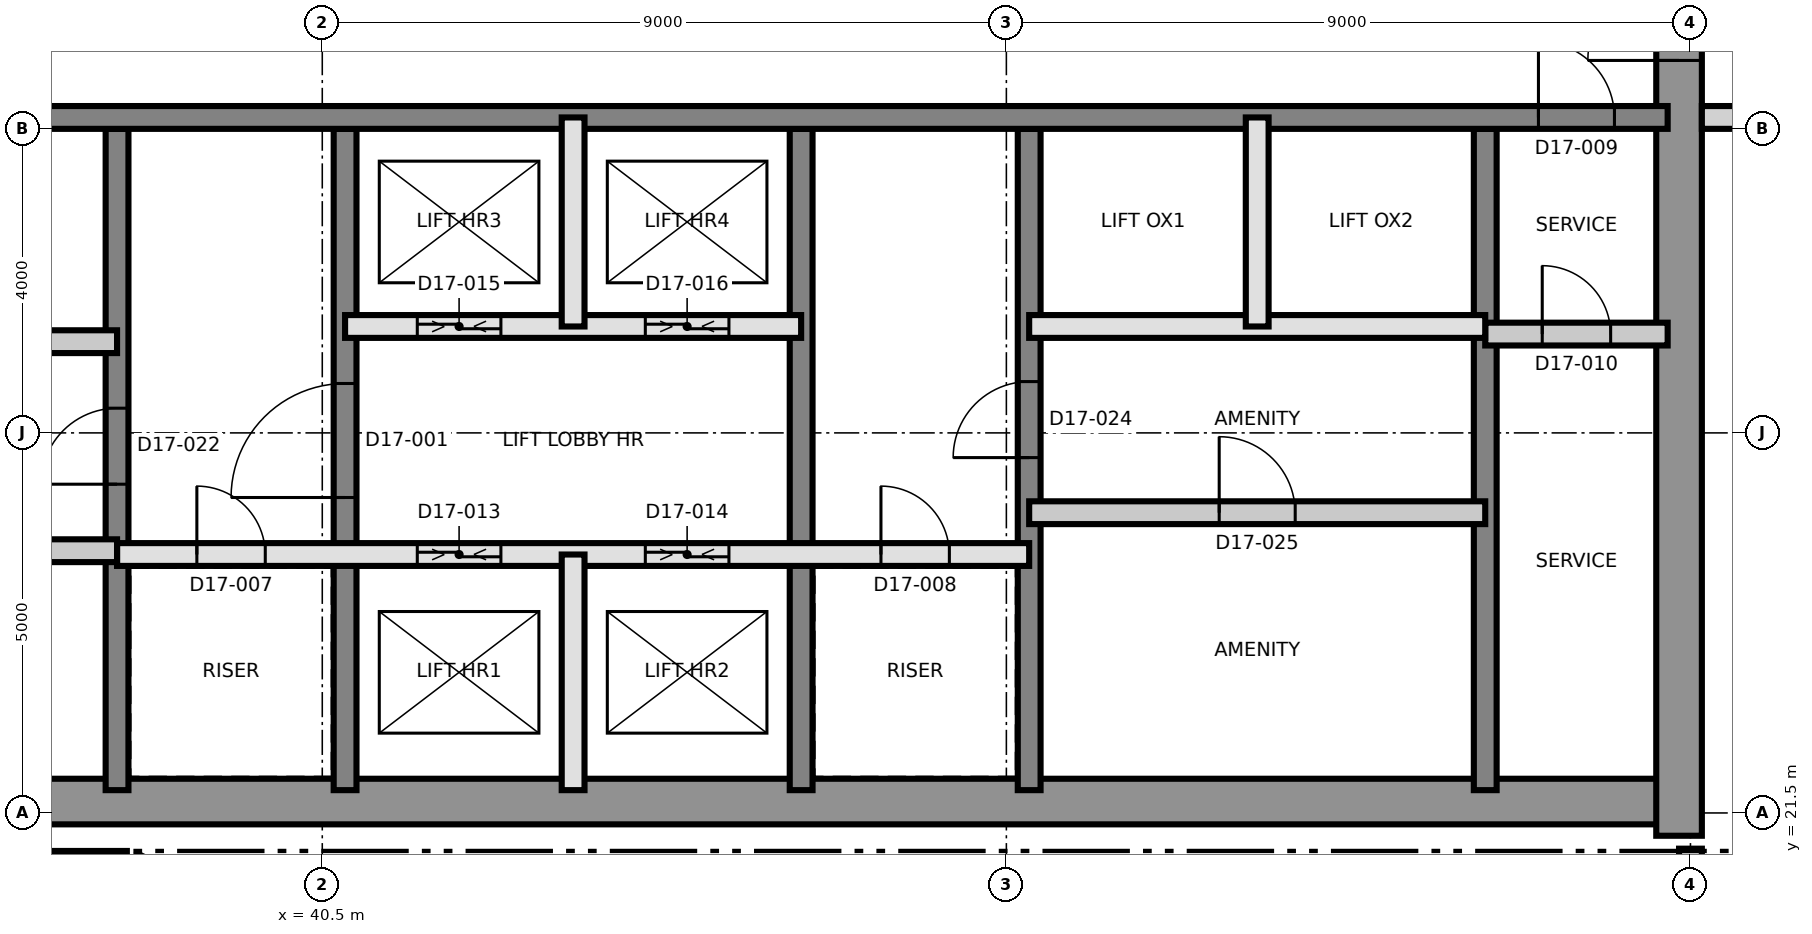
"""IFC4 building model, lengths in metres.
Left out: names, types, materials, properties, quantities, classifications, styles, units other than length and angle.
Written with IfcOpenShell. Run it as: python <this file> out.ifc"""

import sys

from ifc_helpers import new_model, si_unit, direction, frame, frame_2d, origin, place, context, subcontext, project, spatial, rectangle, extrude, element, fill, save


model = new_model("IFC4")
c1 = context("Model", 3, precision=1e-05, world=origin(), true_north=direction((0.0, 1.0)))
c2 = subcontext(c1, "Body", "Model", "MODEL_VIEW")
j1 = project(units=[si_unit("LENGTHUNIT", "METRE"), si_unit("PLANEANGLEUNIT", "RADIAN")], contexts=[c1])
p1 = place(None, origin())
s1 = spatial("IfcSite", under=j1, at=p1, CompositionType="ELEMENT")
p2 = place(p1, origin())
s2 = spatial("IfcBuilding", under=s1, at=p2, CompositionType="ELEMENT")
p3 = place(p2, frame((0.0, 0.0, 171.8)))
s3 = spatial("IfcBuildingStorey", under=s2, at=p3, CompositionType="ELEMENT", Elevation=171.8)
p4 = place(p3, frame((31.2, 21.65, 0.0), z_axis=(0.0, 0.0, 1.0), x_axis=(1.0, 0.0, 0.0)))
e1 = element("IfcWall", 1, at=p4, inside=s3, PredefinedType="SHEAR", context=c2, shape_type="SweptSolid", body=[
    extrude(rectangle(XDim=27.0, YDim=0.6, at=frame_2d((13.5, 0.0))), origin(), (0.0, 0.0, 1.0), 3.7),
])
p5 = place(p3, frame((58.35, 21.2, 0.0), z_axis=(0.0, 0.0, 1.0), x_axis=(0.0, 1.0, 0.0)))
e2 = element("IfcWall", 2, at=p5, inside=s3, PredefinedType="SHEAR", context=c2, shape_type="SweptSolid", body=[
    extrude(rectangle(XDim=18.6, YDim=0.6, at=frame_2d((9.3, 0.0))), origin(), (0.0, 0.0, 1.0), 3.7),
])
p6 = place(p5, frame((10.2, 0.0, 0.0)))
e3 = element("IfcOpeningElement", 3, at=p6, cuts=e2, PredefinedType="OPENING", context=c2, shape_type="SweptSolid", body=[
    extrude(rectangle(XDim=1.2, YDim=2.1, at=frame_2d((0.6, 1.05))), frame((0.0, 0.31, 0.0), z_axis=(0.0, -1.0, 0.0), x_axis=(1.0, 0.0, 0.0)), (0.0, 0.0, 1.0), 0.62),
])
p7 = place(p3, frame((37.8, 21.8, 0.0), z_axis=(0.0, 0.0, 1.0), x_axis=(0.0, 1.0, 0.0)))
e4 = element("IfcWall", 4, at=p7, inside=s3, PredefinedType="SHEAR", context=c2, shape_type="SweptSolid", body=[
    extrude(rectangle(XDim=8.7, YDim=0.3, at=frame_2d((4.35, 0.0))), origin(), (0.0, 0.0, 1.0), 3.7),
])
p8 = place(p7, frame((4.025, 0.0, 0.0)))
e5 = element("IfcOpeningElement", 5, at=p8, cuts=e4, PredefinedType="OPENING", context=c2, shape_type="SweptSolid", body=[
    extrude(rectangle(XDim=1.0, YDim=2.1, at=frame_2d((0.5, 1.05))), frame((0.0, 0.16, 0.0), z_axis=(0.0, -1.0, 0.0), x_axis=(1.0, 0.0, 0.0)), (0.0, 0.0, 1.0), 0.32),
])
p9 = place(p3, frame((40.8, 21.8, 0.0), z_axis=(0.0, 0.0, 1.0), x_axis=(0.0, 1.0, 0.0)))
e6 = element("IfcWall", 6, at=p9, inside=s3, PredefinedType="SHEAR", context=c2, shape_type="SweptSolid", body=[
    extrude(rectangle(XDim=8.7, YDim=0.3, at=frame_2d((4.35, 0.0))), origin(), (0.0, 0.0, 1.0), 3.7),
])
p10 = place(p9, frame((3.85, 0.0, 0.0)))
e7 = element("IfcOpeningElement", 7, at=p10, cuts=e6, PredefinedType="OPENING", context=c2, shape_type="SweptSolid", body=[
    extrude(rectangle(XDim=1.5, YDim=2.1, at=frame_2d((0.75, 1.05))), frame((0.0, 0.16, 0.0), z_axis=(0.0, -1.0, 0.0), x_axis=(1.0, 0.0, 0.0)), (0.0, 0.0, 1.0), 0.32),
])
p11 = place(p3, frame((46.8, 21.8, 0.0), z_axis=(0.0, 0.0, 1.0), x_axis=(0.0, 1.0, 0.0)))
e8 = element("IfcWall", 8, at=p11, inside=s3, PredefinedType="SHEAR", context=c2, shape_type="SweptSolid", body=[
    extrude(rectangle(XDim=8.7, YDim=0.3, at=frame_2d((4.35, 0.0))), origin(), (0.0, 0.0, 1.0), 3.7),
])
p12 = place(p3, frame((49.8, 21.8, 0.0), z_axis=(0.0, 0.0, 1.0), x_axis=(0.0, 1.0, 0.0)))
e9 = element("IfcWall", 9, at=p12, inside=s3, PredefinedType="SHEAR", context=c2, shape_type="SweptSolid", body=[
    extrude(rectangle(XDim=8.7, YDim=0.3, at=frame_2d((4.35, 0.0))), origin(), (0.0, 0.0, 1.0), 3.7),
])
p13 = place(p12, frame((4.375, 0.0, 0.0)))
e10 = element("IfcOpeningElement", 10, at=p13, cuts=e9, PredefinedType="OPENING", context=c2, shape_type="SweptSolid", body=[
    extrude(rectangle(XDim=1.0, YDim=2.1, at=frame_2d((0.5, 1.05))), frame((0.0, 0.16, 0.0), z_axis=(0.0, -1.0, 0.0), x_axis=(1.0, 0.0, 0.0)), (0.0, 0.0, 1.0), 0.32),
])
p14 = place(p3, frame((55.8, 21.8, 0.0), z_axis=(0.0, 0.0, 1.0), x_axis=(0.0, 1.0, 0.0)))
e11 = element("IfcWall", 11, at=p14, inside=s3, PredefinedType="SHEAR", context=c2, shape_type="SweptSolid", body=[
    extrude(rectangle(XDim=8.7, YDim=0.3, at=frame_2d((4.35, 0.0))), origin(), (0.0, 0.0, 1.0), 3.7),
])
p15 = place(p3, frame((31.8, 30.65, 0.0), z_axis=(0.0, 0.0, 1.0), x_axis=(1.0, 0.0, 0.0)))
e12 = element("IfcWall", 12, at=p15, inside=s3, PredefinedType="SHEAR", context=c2, shape_type="SweptSolid", body=[
    extrude(rectangle(XDim=26.4, YDim=0.3, at=frame_2d((13.2, 0.0))), origin(), (0.0, 0.0, 1.0), 3.7),
])
p16 = place(p15, frame((24.7, 0.0, 0.0)))
e13 = element("IfcOpeningElement", 13, at=p16, cuts=e12, PredefinedType="OPENING", context=c2, shape_type="SweptSolid", body=[
    extrude(rectangle(XDim=1.0, YDim=2.1, at=frame_2d((0.5, 1.05))), frame((0.0, 0.16, 0.0), z_axis=(0.0, -1.0, 0.0), x_axis=(1.0, 0.0, 0.0)), (0.0, 0.0, 1.0), 0.32),
])
p17 = place(p15, frame((4.0, 0.0, 0.0)))
e14 = element("IfcOpeningElement", 14, at=p17, cuts=e12, PredefinedType="OPENING", context=c2, shape_type="SweptSolid", body=[
    extrude(rectangle(XDim=1.0, YDim=2.1, at=frame_2d((0.5, 1.05))), frame((0.0, 0.16, 0.0), z_axis=(0.0, -1.0, 0.0), x_axis=(1.0, 0.0, 0.0)), (0.0, 0.0, 1.0), 0.32),
])
p18 = place(p3, frame((31.36, 20.85, 0.0), z_axis=(0.0, 0.0, 1.0), x_axis=(1.0, 0.0, 0.0)))
e15 = element("IfcWall", 15, at=p18, inside=s3, PredefinedType="SOLIDWALL", context=c2, shape_type="SweptSolid", body=[
    extrude(rectangle(XDim=6.569, YDim=0.3, at=frame_2d((3.285, 0.0))), origin(), (0.0, 0.0, 1.0), 3.4),
])
p19 = place(p3, frame((37.995, 20.834, 0.0), z_axis=(0.0, 0.0, 1.0), x_axis=(0.896947675211, -0.442136707291, 0.0)))
e16 = element("IfcWall", 16, at=p19, inside=s3, PredefinedType="SOLIDWALL", context=c2, shape_type="SweptSolid", body=[
    extrude(rectangle(XDim=0.501, YDim=0.3, at=frame_2d((0.25, 0.0))), origin(), (0.0, 0.0, 1.0), 3.4),
])
p20 = place(p3, frame((37.8, 24.9, 0.0), z_axis=(0.0, 0.0, 1.0), x_axis=(1.0, 0.0, 0.0)))
e17 = element("IfcWall", 17, at=p20, inside=s3, PredefinedType="SOLIDWALL", context=c2, shape_type="SweptSolid", body=[
    extrude(rectangle(XDim=12.0, YDim=0.3, at=frame_2d((6.0, 0.0))), origin(), (0.0, 0.0, 1.0), 3.4),
])
p21 = place(p20, frame((1.05, 0.0, 0.0)))
e18 = element("IfcOpeningElement", 18, at=p21, cuts=e17, PredefinedType="OPENING", context=c2, shape_type="SweptSolid", body=[
    extrude(rectangle(XDim=0.9, YDim=2.1, at=frame_2d((0.45, 1.05))), frame((0.0, 0.16, 0.0), z_axis=(0.0, -1.0, 0.0), x_axis=(1.0, 0.0, 0.0)), (0.0, 0.0, 1.0), 0.32),
])
p22 = place(p20, frame((10.05, 0.0, 0.0)))
e19 = element("IfcOpeningElement", 19, at=p22, cuts=e17, PredefinedType="OPENING", context=c2, shape_type="SweptSolid", body=[
    extrude(rectangle(XDim=0.9, YDim=2.1, at=frame_2d((0.45, 1.05))), frame((0.0, 0.16, 0.0), z_axis=(0.0, -1.0, 0.0), x_axis=(1.0, 0.0, 0.0)), (0.0, 0.0, 1.0), 0.32),
])
p23 = place(p20, frame((3.95, 0.0, 0.0)))
e20 = element("IfcOpeningElement", 20, at=p23, cuts=e17, PredefinedType="OPENING", context=c2, shape_type="SweptSolid", body=[
    extrude(rectangle(XDim=1.1, YDim=2.4, at=frame_2d((0.55, 1.2))), frame((0.0, 0.16, 0.0), z_axis=(0.0, -1.0, 0.0), x_axis=(1.0, 0.0, 0.0)), (0.0, 0.0, 1.0), 0.32),
])
p24 = place(p20, frame((6.95, 0.0, 0.0)))
e21 = element("IfcOpeningElement", 21, at=p24, cuts=e17, PredefinedType="OPENING", context=c2, shape_type="SweptSolid", body=[
    extrude(rectangle(XDim=1.1, YDim=2.4, at=frame_2d((0.55, 1.2))), frame((0.0, 0.16, 0.0), z_axis=(0.0, -1.0, 0.0), x_axis=(1.0, 0.0, 0.0)), (0.0, 0.0, 1.0), 0.32),
])
p25 = place(p3, frame((31.8, 24.95, 0.0), z_axis=(0.0, 0.0, 1.0), x_axis=(1.0, 0.0, 0.0)))
e22 = element("IfcWall", 22, at=p25, inside=s3, PredefinedType="PARTITIONING", context=c2, shape_type="SweptSolid", body=[
    extrude(rectangle(XDim=6.0, YDim=0.3, at=frame_2d((3.0, 0.0))), origin(), (0.0, 0.0, 1.0), 3.4),
])
p26 = place(p25, frame((2.5, 0.0, 0.0)))
e23 = element("IfcOpeningElement", 23, at=p26, cuts=e22, PredefinedType="OPENING", context=c2, shape_type="SweptSolid", body=[
    extrude(rectangle(XDim=1.0, YDim=2.1, at=frame_2d((0.5, 1.05))), frame((0.0, 0.16, 0.0), z_axis=(0.0, -1.0, 0.0), x_axis=(1.0, 0.0, 0.0)), (0.0, 0.0, 1.0), 0.32),
])
p27 = place(p3, frame((49.8, 25.45, 0.0), z_axis=(0.0, 0.0, 1.0), x_axis=(1.0, 0.0, 0.0)))
e24 = element("IfcWall", 24, at=p27, inside=s3, PredefinedType="PARTITIONING", context=c2, shape_type="SweptSolid", body=[
    extrude(rectangle(XDim=6.0, YDim=0.3, at=frame_2d((3.0, 0.0))), origin(), (0.0, 0.0, 1.0), 3.4),
])
p28 = place(p27, frame((2.5, 0.0, 0.0)))
e25 = element("IfcOpeningElement", 25, at=p28, cuts=e24, PredefinedType="OPENING", context=c2, shape_type="SweptSolid", body=[
    extrude(rectangle(XDim=1.0, YDim=2.1, at=frame_2d((0.5, 1.05))), frame((0.0, 0.16, 0.0), z_axis=(0.0, -1.0, 0.0), x_axis=(1.0, 0.0, 0.0)), (0.0, 0.0, 1.0), 0.32),
])
p29 = place(p3, frame((31.8, 27.7, 0.0), z_axis=(0.0, 0.0, 1.0), x_axis=(1.0, 0.0, 0.0)))
e26 = element("IfcWall", 26, at=p29, inside=s3, PredefinedType="PARTITIONING", context=c2, shape_type="SweptSolid", body=[
    extrude(rectangle(XDim=6.0, YDim=0.3, at=frame_2d((3.0, 0.0))), origin(), (0.0, 0.0, 1.0), 3.4),
])
p30 = place(p3, frame((55.8, 27.8, 0.0), z_axis=(0.0, 0.0, 1.0), x_axis=(1.0, 0.0, 0.0)))
e27 = element("IfcWall", 27, at=p30, inside=s3, PredefinedType="PARTITIONING", context=c2, shape_type="SweptSolid", body=[
    extrude(rectangle(XDim=2.4, YDim=0.3, at=frame_2d((1.2, 0.0))), origin(), (0.0, 0.0, 1.0), 3.4),
])
p31 = place(p30, frame((0.75, 0.0, 0.0)))
e28 = element("IfcOpeningElement", 28, at=p31, cuts=e27, PredefinedType="OPENING", context=c2, shape_type="SweptSolid", body=[
    extrude(rectangle(XDim=0.9, YDim=2.1, at=frame_2d((0.45, 1.05))), frame((0.0, 0.16, 0.0), z_axis=(0.0, -1.0, 0.0), x_axis=(1.0, 0.0, 0.0)), (0.0, 0.0, 1.0), 0.32),
])
p32 = place(p3, frame((40.8, 27.9, 0.0), z_axis=(0.0, 0.0, 1.0), x_axis=(1.0, 0.0, 0.0)))
e29 = element("IfcWall", 29, at=p32, inside=s3, PredefinedType="SOLIDWALL", context=c2, shape_type="SweptSolid", body=[
    extrude(rectangle(XDim=6.0, YDim=0.3, at=frame_2d((3.0, 0.0))), origin(), (0.0, 0.0, 1.0), 3.4),
])
p33 = place(p32, frame((0.95, 0.0, 0.0)))
e30 = element("IfcOpeningElement", 30, at=p33, cuts=e29, PredefinedType="OPENING", context=c2, shape_type="SweptSolid", body=[
    extrude(rectangle(XDim=1.1, YDim=2.4, at=frame_2d((0.55, 1.2))), frame((0.0, 0.16, 0.0), z_axis=(0.0, -1.0, 0.0), x_axis=(1.0, 0.0, 0.0)), (0.0, 0.0, 1.0), 0.32),
])
p34 = place(p32, frame((3.95, 0.0, 0.0)))
e31 = element("IfcOpeningElement", 31, at=p34, cuts=e29, PredefinedType="OPENING", context=c2, shape_type="SweptSolid", body=[
    extrude(rectangle(XDim=1.1, YDim=2.4, at=frame_2d((0.55, 1.2))), frame((0.0, 0.16, 0.0), z_axis=(0.0, -1.0, 0.0), x_axis=(1.0, 0.0, 0.0)), (0.0, 0.0, 1.0), 0.32),
])
p35 = place(p3, frame((49.8, 27.9, 0.0), z_axis=(0.0, 0.0, 1.0), x_axis=(1.0, 0.0, 0.0)))
e32 = element("IfcWall", 32, at=p35, inside=s3, PredefinedType="SOLIDWALL", context=c2, shape_type="SweptSolid", body=[
    extrude(rectangle(XDim=6.0, YDim=0.3, at=frame_2d((3.0, 0.0))), origin(), (0.0, 0.0, 1.0), 3.4),
])
p36 = place(p3, frame((43.8, 21.8, 0.0), z_axis=(0.0, 0.0, 1.0), x_axis=(0.0, 1.0, 0.0)))
e33 = element("IfcWall", 33, at=p36, inside=s3, PredefinedType="SOLIDWALL", context=c2, shape_type="SweptSolid", body=[
    extrude(rectangle(XDim=3.1, YDim=0.3, at=frame_2d((1.55, 0.0))), origin(), (0.0, 0.0, 1.0), 3.4),
])
for number, where, z_axis, x_axis in (
    (34, (43.8, 27.9, 0.0), (0.0, 0.0, 1.0), (0.0, 1.0, 0.0)),
    (35, (52.8, 27.9, 0.0), (0.0, 0.0, 1.0), (0.0, 1.0, 0.0)),
):
    element("IfcWall", number, at=place(p3, frame(where, z_axis=z_axis, x_axis=x_axis)), inside=s3, PredefinedType="SOLIDWALL", context=c2, shape_type="SweptSolid", body=[
        extrude(rectangle(XDim=2.75, YDim=0.3, at=frame_2d((1.375, 0.0))), origin(), (0.0, 0.0, 1.0), 3.4),
    ])
p37 = place(p3, frame((58.65, 30.65, 0.0), z_axis=(0.0, 0.0, 1.0), x_axis=(1.0, 0.0, 0.0)))
e36 = element("IfcWall", 36, at=p37, inside=s3, PredefinedType="PARTITIONING", context=c2, shape_type="SweptSolid", body=[
    extrude(rectangle(XDim=8.88, YDim=0.3, at=frame_2d((4.44, 0.0))), origin(), (0.0, 0.0, 1.0), 3.4),
])
p38 = place(p37, frame((2.2, 0.0, 0.0)))
e37 = element("IfcOpeningElement", 37, at=p38, cuts=e36, PredefinedType="OPENING", context=c2, shape_type="SweptSolid", body=[
    extrude(rectangle(XDim=1.0, YDim=2.4, at=frame_2d((0.5, 1.2))), frame((0.0, 0.16, 0.0), z_axis=(0.0, -1.0, 0.0), x_axis=(1.0, 0.0, 0.0)), (0.0, 0.0, 1.0), 0.32),
])
p39 = place(p3, frame((58.5, 19.705, 0.0), z_axis=(0.0, 0.0, 1.0), x_axis=(0.0, 1.0, 0.0)))
e38 = element("IfcWall", 38, at=p39, inside=s3, PredefinedType="PARTITIONING", context=c2, shape_type="SweptSolid", body=[
    extrude(rectangle(XDim=1.325, YDim=0.3, at=frame_2d((0.663, 0.0))), origin(), (0.0, 0.0, 1.0), 3.4),
])
p40 = place(p10, origin())
e39 = element("IfcDoor", 39, at=p40, inside=s3, OperationType="SINGLE_SWING_RIGHT", PredefinedType="DOOR", context=c2, shape_type="SweptSolid", body=[
    extrude(rectangle(XDim=1.5, YDim=2.1, at=frame_2d((0.75, 1.05))), frame((0.0, 0.025, 0.0), z_axis=(0.0, -1.0, 0.0), x_axis=(1.0, 0.0, 0.0)), (0.0, 0.0, 1.0), 0.05),
])
fill(e7, e39)
p41 = place(p21, origin())
e40 = element("IfcDoor", 40, at=p41, inside=s3, OperationType="SINGLE_SWING_LEFT", PredefinedType="DOOR", context=c2, shape_type="SweptSolid", body=[
    extrude(rectangle(XDim=0.9, YDim=2.1, at=frame_2d((0.45, 1.05))), frame((0.0, 0.025, 0.0), z_axis=(0.0, -1.0, 0.0), x_axis=(1.0, 0.0, 0.0)), (0.0, 0.0, 1.0), 0.05),
])
fill(e18, e40)
p42 = place(p22, origin())
e41 = element("IfcDoor", 41, at=p42, inside=s3, OperationType="SINGLE_SWING_RIGHT", PredefinedType="DOOR", context=c2, shape_type="SweptSolid", body=[
    extrude(rectangle(XDim=0.9, YDim=2.1, at=frame_2d((0.45, 1.05))), frame((0.0, 0.025, 0.0), z_axis=(0.0, -1.0, 0.0), x_axis=(1.0, 0.0, 0.0)), (0.0, 0.0, 1.0), 0.05),
])
fill(e19, e41)
p43 = place(p16, origin())
e42 = element("IfcDoor", 42, at=p43, inside=s3, OperationType="SINGLE_SWING_LEFT", PredefinedType="DOOR", context=c2, shape_type="SweptSolid", body=[
    extrude(rectangle(XDim=1.0, YDim=2.1, at=frame_2d((0.5, 1.05))), frame((0.0, 0.025, 0.0), z_axis=(0.0, -1.0, 0.0), x_axis=(1.0, 0.0, 0.0)), (0.0, 0.0, 1.0), 0.05),
])
fill(e13, e42)
p44 = place(p31, origin())
e43 = element("IfcDoor", 43, at=p44, inside=s3, OperationType="SINGLE_SWING_RIGHT", PredefinedType="DOOR", context=c2, shape_type="SweptSolid", body=[
    extrude(rectangle(XDim=0.9, YDim=2.1, at=frame_2d((0.45, 1.05))), frame((0.0, 0.025, 0.0), z_axis=(0.0, -1.0, 0.0), x_axis=(1.0, 0.0, 0.0)), (0.0, 0.0, 1.0), 0.05),
])
fill(e28, e43)
p45 = place(p6, origin())
e44 = element("IfcDoor", 44, at=p45, inside=s3, OperationType="SINGLE_SWING_LEFT", PredefinedType="DOOR", context=c2, shape_type="SweptSolid", body=[
    extrude(rectangle(XDim=1.2, YDim=2.1, at=frame_2d((0.6, 1.05))), frame((0.0, 0.025, 0.0), z_axis=(0.0, -1.0, 0.0), x_axis=(1.0, 0.0, 0.0)), (0.0, 0.0, 1.0), 0.05),
])
fill(e3, e44)
p46 = place(p23, origin())
e45 = element("IfcDoor", 45, at=p46, inside=s3, OperationType="SLIDING_TO_LEFT", PredefinedType="DOOR", context=c2, shape_type="SweptSolid", body=[
    extrude(rectangle(XDim=1.1, YDim=2.4, at=frame_2d((0.55, 1.2))), frame((0.0, 0.025, 0.0), z_axis=(0.0, -1.0, 0.0), x_axis=(1.0, 0.0, 0.0)), (0.0, 0.0, 1.0), 0.05),
])
fill(e20, e45)
p47 = place(p24, origin())
e46 = element("IfcDoor", 46, at=p47, inside=s3, OperationType="SLIDING_TO_LEFT", PredefinedType="DOOR", context=c2, shape_type="SweptSolid", body=[
    extrude(rectangle(XDim=1.1, YDim=2.4, at=frame_2d((0.55, 1.2))), frame((0.0, 0.025, 0.0), z_axis=(0.0, -1.0, 0.0), x_axis=(1.0, 0.0, 0.0)), (0.0, 0.0, 1.0), 0.05),
])
fill(e21, e46)
p48 = place(p33, origin())
e47 = element("IfcDoor", 47, at=p48, inside=s3, OperationType="SLIDING_TO_LEFT", PredefinedType="DOOR", context=c2, shape_type="SweptSolid", body=[
    extrude(rectangle(XDim=1.1, YDim=2.4, at=frame_2d((0.55, 1.2))), frame((0.0, 0.025, 0.0), z_axis=(0.0, -1.0, 0.0), x_axis=(1.0, 0.0, 0.0)), (0.0, 0.0, 1.0), 0.05),
])
fill(e30, e47)
p49 = place(p34, origin())
e48 = element("IfcDoor", 48, at=p49, inside=s3, OperationType="SLIDING_TO_LEFT", PredefinedType="DOOR", context=c2, shape_type="SweptSolid", body=[
    extrude(rectangle(XDim=1.1, YDim=2.4, at=frame_2d((0.55, 1.2))), frame((0.0, 0.025, 0.0), z_axis=(0.0, -1.0, 0.0), x_axis=(1.0, 0.0, 0.0)), (0.0, 0.0, 1.0), 0.05),
])
fill(e31, e48)
p50 = place(p8, origin())
e49 = element("IfcDoor", 49, at=p50, inside=s3, OperationType="SINGLE_SWING_RIGHT", PredefinedType="DOOR", context=c2, shape_type="SweptSolid", body=[
    extrude(rectangle(XDim=1.0, YDim=2.1, at=frame_2d((0.5, 1.05))), frame((0.0, 0.025, 0.0), z_axis=(0.0, -1.0, 0.0), x_axis=(1.0, 0.0, 0.0)), (0.0, 0.0, 1.0), 0.05),
])
fill(e5, e49)
p51 = place(p13, origin())
e50 = element("IfcDoor", 50, at=p51, inside=s3, OperationType="SINGLE_SWING_RIGHT", PredefinedType="DOOR", context=c2, shape_type="SweptSolid", body=[
    extrude(rectangle(XDim=1.0, YDim=2.1, at=frame_2d((0.5, 1.05))), frame((0.0, 0.025, 0.0), z_axis=(0.0, -1.0, 0.0), x_axis=(1.0, 0.0, 0.0)), (0.0, 0.0, 1.0), 0.05),
])
fill(e10, e50)
p52 = place(p28, origin())
e51 = element("IfcDoor", 51, at=p52, inside=s3, OperationType="SINGLE_SWING_RIGHT", PredefinedType="DOOR", context=c2, shape_type="SweptSolid", body=[
    extrude(rectangle(XDim=1.0, YDim=2.1, at=frame_2d((0.5, 1.05))), frame((0.0, 0.025, 0.0), z_axis=(0.0, -1.0, 0.0), x_axis=(1.0, 0.0, 0.0)), (0.0, 0.0, 1.0), 0.05),
])
fill(e25, e51)
save(model, sys.argv[1])
